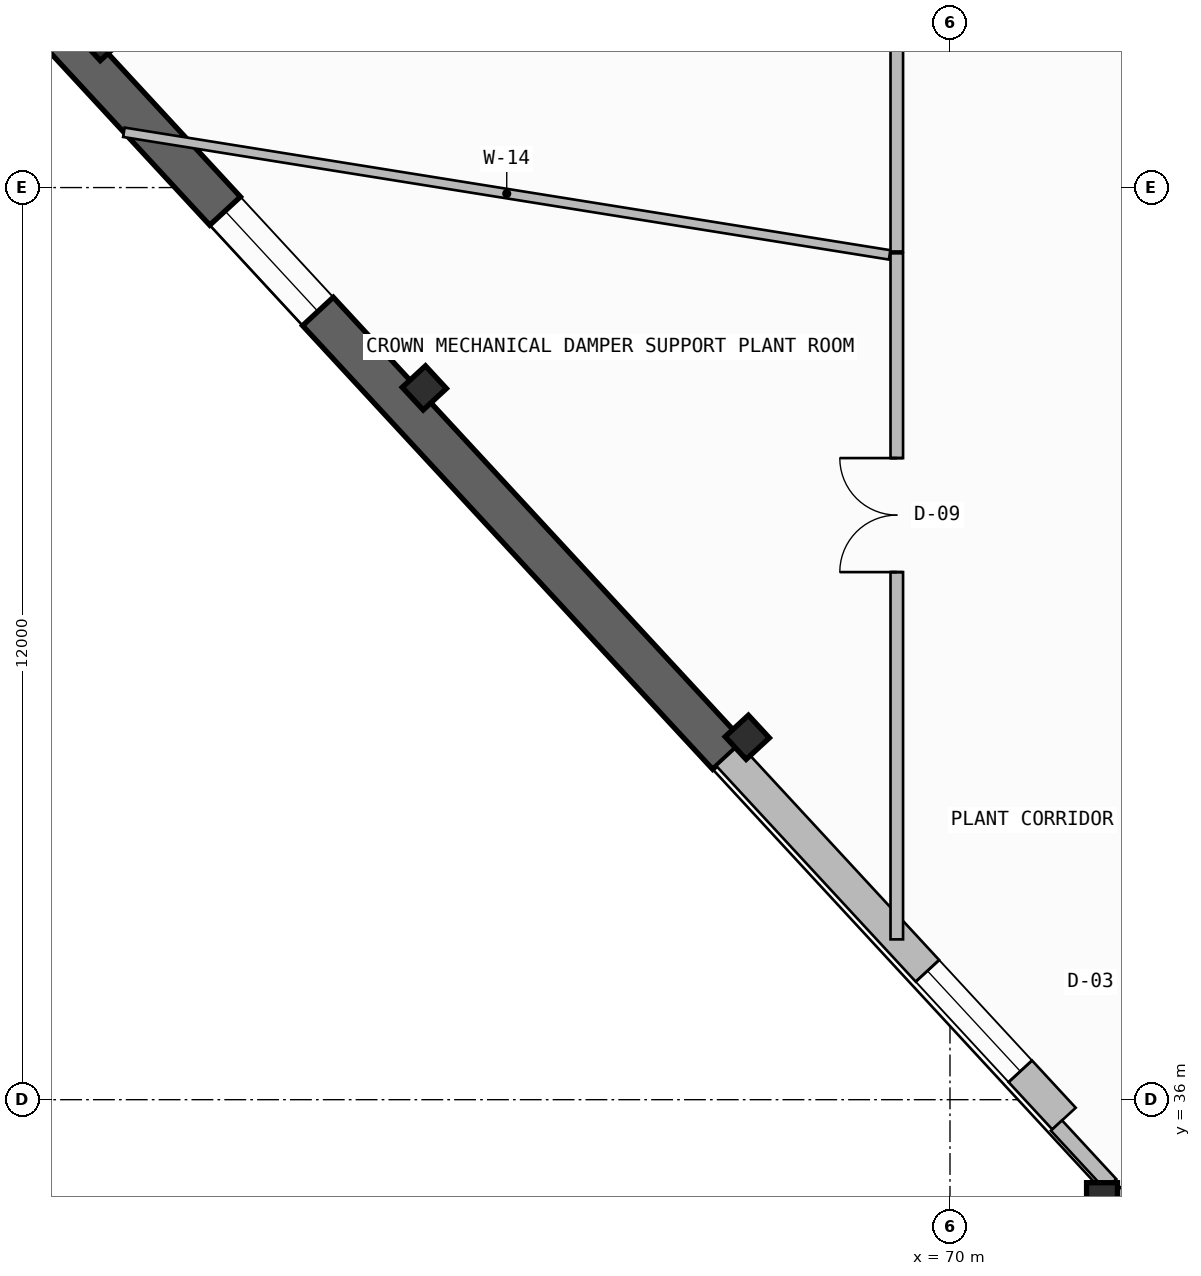
"""IFC4 building model, lengths in metres.
Left out: names, types, materials, properties, quantities, classifications, styles, units other than length and angle.
Written with IfcOpenShell. Run it as: python <this file> out.ifc"""

import sys

from ifc_helpers import new_model, si_unit, direction, frame, frame_2d, origin, origin_2d, place, context, subcontext, project, spatial, polyline, rectangle, i_section, outline, extrude, element, fill, save


model = new_model("IFC4")
c1 = context("Model", 3, precision=1e-05, world=origin(), true_north=direction((0.0, 1.0)))
c2 = subcontext(c1, "Body", "Model", "MODEL_VIEW")
j1 = project(units=[si_unit("LENGTHUNIT", "METRE"), si_unit("PLANEANGLEUNIT", "RADIAN")], contexts=[c1])
p1 = place(None, origin())
s1 = spatial("IfcSite", under=j1, at=p1, CompositionType="ELEMENT")
p2 = place(p1, origin())
s2 = spatial("IfcBuilding", under=s1, at=p2, CompositionType="ELEMENT")
p3 = place(p2, frame((0.0, 0.0, 307.78)))
s3 = spatial("IfcBuildingStorey", under=s2, at=p3, CompositionType="ELEMENT", Elevation=307.78)
for number, where, z_axis, x_axis in (
    (1, (72.0, 34.7, 0.0), (0.0, 0.0, 1.0), (1.0, 0.0, 0.0)),
    (2, (58.835, 49.961, 0.0), (0.0, 0.0, 1.0), (-0.679, 0.734, 0.0)),
    (3, (63.084, 45.364, 0.0), (0.0, 0.0, 1.0), (-0.679, 0.734, 0.0)),
    (4, (67.333, 40.768, 0.0), (0.0, 0.0, 1.0), (-0.679, 0.734, 0.0)),
):
    element("IfcColumn", number, at=place(p3, frame(where, z_axis=z_axis, x_axis=x_axis)), inside=s3, PredefinedType="COLUMN", context=c2, shape_type="SweptSolid", body=[
        extrude(i_section(OverallWidth=0.406, OverallDepth=0.416, WebThickness=0.03, FlangeThickness=0.048, FilletRadius=0.015, at=origin_2d()), origin(), (0.0, 0.0, 1.0), 4.8),
    ])
p4 = place(p3, frame((54.805, 53.812, -0.2), z_axis=(0.0, 0.0, 1.0), x_axis=(0.678803115619, -0.734320318543, 0.0)))
e5 = element("IfcWall", 5, at=p4, inside=s3, PredefinedType="SHEAR", context=c2, shape_type="SweptSolid", body=[
    extrude(outline(polyline([(0.0, 0.0), (18.083, 0.0), (18.083, 4.8), (0.0, 4.8), (0.0, 0.0)])), frame((0.0, 0.275, 0.0), z_axis=(0.0, -1.0, 0.0), x_axis=(1.0, 0.0, 0.0)), (0.0, 0.0, 1.0), 0.55),
])
p5 = place(p4, frame((8.334, 0.0, 0.7)))
e6 = element("IfcOpeningElement", 6, at=p5, cuts=e5, PredefinedType="OPENING", context=c2, shape_type="SweptSolid", body=[
    extrude(rectangle(XDim=1.8, YDim=1.2, at=frame_2d((0.9, 0.6))), frame((0.0, 0.285, 0.0), z_axis=(0.0, -1.0, 0.0), x_axis=(1.0, 0.0, 0.0)), (0.0, 0.0, 1.0), 0.57),
])
p6 = place(p3, frame((67.08, 40.533, 0.0), z_axis=(0.0, 0.0, 1.0), x_axis=(0.678800006437, -0.734323192648, 0.0)))
e7 = element("IfcWall", 7, at=p6, inside=s3, PredefinedType="SOLIDWALL", context=c2, shape_type="SweptSolid", body=[
    extrude(outline(polyline([(0.0, 0.0), (6.512, 0.0), (6.512, 4.6), (0.0, 4.6), (0.0, 0.0)])), frame((0.0, 0.21, 0.0), z_axis=(0.0, -1.0, 0.0), x_axis=(1.0, 0.0, 0.0)), (0.0, 0.0, 1.0), 0.42),
])
p7 = place(p6, frame((3.865, 0.0, 0.7)))
e8 = element("IfcOpeningElement", 8, at=p7, cuts=e7, PredefinedType="OPENING", context=c2, shape_type="SweptSolid", body=[
    extrude(rectangle(XDim=1.8, YDim=1.2, at=frame_2d((0.9, 0.6))), frame((0.0, 0.22, 0.0), z_axis=(0.0, -1.0, 0.0), x_axis=(1.0, 0.0, 0.0)), (0.0, 0.0, 1.0), 0.44),
])
p8 = place(p3, frame((72.881, 34.058, 0.0), z_axis=(0.0, 0.0, 1.0), x_axis=(-0.678872530156, 0.734256145905, 0.0)))
e9 = element("IfcWall", 9, at=p8, inside=s3, PredefinedType="PARAPET", context=c2, shape_type="SweptSolid", body=[
    extrude(rectangle(XDim=1.01, YDim=0.2, at=frame_2d((0.505, 0.0))), origin(), (0.0, 0.0, 1.0), 1.15),
])
p9 = place(p3, frame((72.115, 34.887, 0.0), z_axis=(0.0, 0.0, 1.0), x_axis=(-0.678713667452, 0.734402994012, 0.0)))
e10 = element("IfcWall", 10, at=p9, inside=s3, PredefinedType="PARAPET", context=c2, shape_type="SweptSolid", body=[
    extrude(rectangle(XDim=1.052, YDim=0.2, at=frame_2d((0.526, 0.0))), origin(), (0.0, 0.0, 1.0), 1.15),
])
p10 = place(p3, frame((69.3, 47.135, 0.0), z_axis=(0.0, 0.0, 1.0), x_axis=(0.0, -1.0, 0.0)))
e11 = element("IfcWall", 11, at=p10, inside=s3, PredefinedType="PARTITIONING", context=c2, shape_type="SweptSolid", body=[
    extrude(rectangle(XDim=9.026, YDim=0.165, at=frame_2d((4.513, 0.0))), origin(), (0.0, 0.0, 1.0), 4.6),
])
p11 = place(p10, frame((2.694, 0.0, 0.0)))
e12 = element("IfcOpeningElement", 12, at=p11, cuts=e11, PredefinedType="OPENING", context=c2, shape_type="SweptSolid", body=[
    extrude(rectangle(XDim=1.5, YDim=2.25, at=frame_2d((0.75, 1.125))), frame((0.0, 0.093, 0.0), z_axis=(0.0, -1.0, 0.0), x_axis=(1.0, 0.0, 0.0)), (0.0, 0.0, 1.0), 0.185),
])
p12 = place(p3, frame((59.131, 48.727, 0.0), z_axis=(0.0, 0.0, 1.0), x_axis=(0.987428385087, -0.158067024787, 0.0)))
e13 = element("IfcWall", 13, at=p12, inside=s3, PredefinedType="PARTITIONING", context=c2, shape_type="SweptSolid", body=[
    extrude(rectangle(XDim=10.203, YDim=0.125, at=frame_2d((5.102, 0.0))), origin(), (0.0, 0.0, 1.0), 3.985),
])
p13 = place(p3, frame((69.3, 59.35, 0.0), z_axis=(0.0, 0.0, 1.0), x_axis=(0.0, -1.0, 0.0)))
e14 = element("IfcWall", 14, at=p13, inside=s3, PredefinedType="PARTITIONING", context=c2, shape_type="SweptSolid", body=[
    extrude(rectangle(XDim=12.191, YDim=0.165, at=frame_2d((6.095, 0.0))), origin(), (0.0, 0.0, 1.0), 2.41),
])
p14 = place(p5, origin())
e15 = element("IfcWindow", 15, at=p14, inside=s3, PartitioningType="SINGLE_PANEL", PredefinedType="WINDOW", context=c2, shape_type="SweptSolid", body=[
    extrude(rectangle(XDim=1.8, YDim=1.2, at=frame_2d((0.9, 0.6))), frame((0.0, 0.03, 0.0), z_axis=(0.0, -1.0, 0.0), x_axis=(1.0, 0.0, 0.0)), (0.0, 0.0, 1.0), 0.06),
])
fill(e6, e15)
p15 = place(p7, origin())
e16 = element("IfcWindow", 16, at=p15, inside=s3, PartitioningType="SINGLE_PANEL", PredefinedType="WINDOW", context=c2, shape_type="SweptSolid", body=[
    extrude(rectangle(XDim=1.8, YDim=1.2, at=frame_2d((0.9, 0.6))), frame((0.0, 0.03, 0.0), z_axis=(0.0, -1.0, 0.0), x_axis=(1.0, 0.0, 0.0)), (0.0, 0.0, 1.0), 0.06),
])
fill(e8, e16)
p16 = place(p11, frame((1.5, 0.0, 0.0), z_axis=(0.0, 0.0, 1.0), x_axis=(-1.0, 0.0, 0.0)))
e17 = element("IfcDoor", 17, at=p16, inside=s3, OperationType="DOUBLE_DOOR_SINGLE_SWING", PredefinedType="DOOR", context=c2, shape_type="SweptSolid", body=[
    extrude(rectangle(XDim=1.5, YDim=2.25, at=frame_2d((0.75, 1.125))), frame((0.0, 0.025, 0.0), z_axis=(0.0, -1.0, 0.0), x_axis=(1.0, 0.0, 0.0)), (0.0, 0.0, 1.0), 0.05),
])
fill(e12, e17)
save(model, sys.argv[1])
